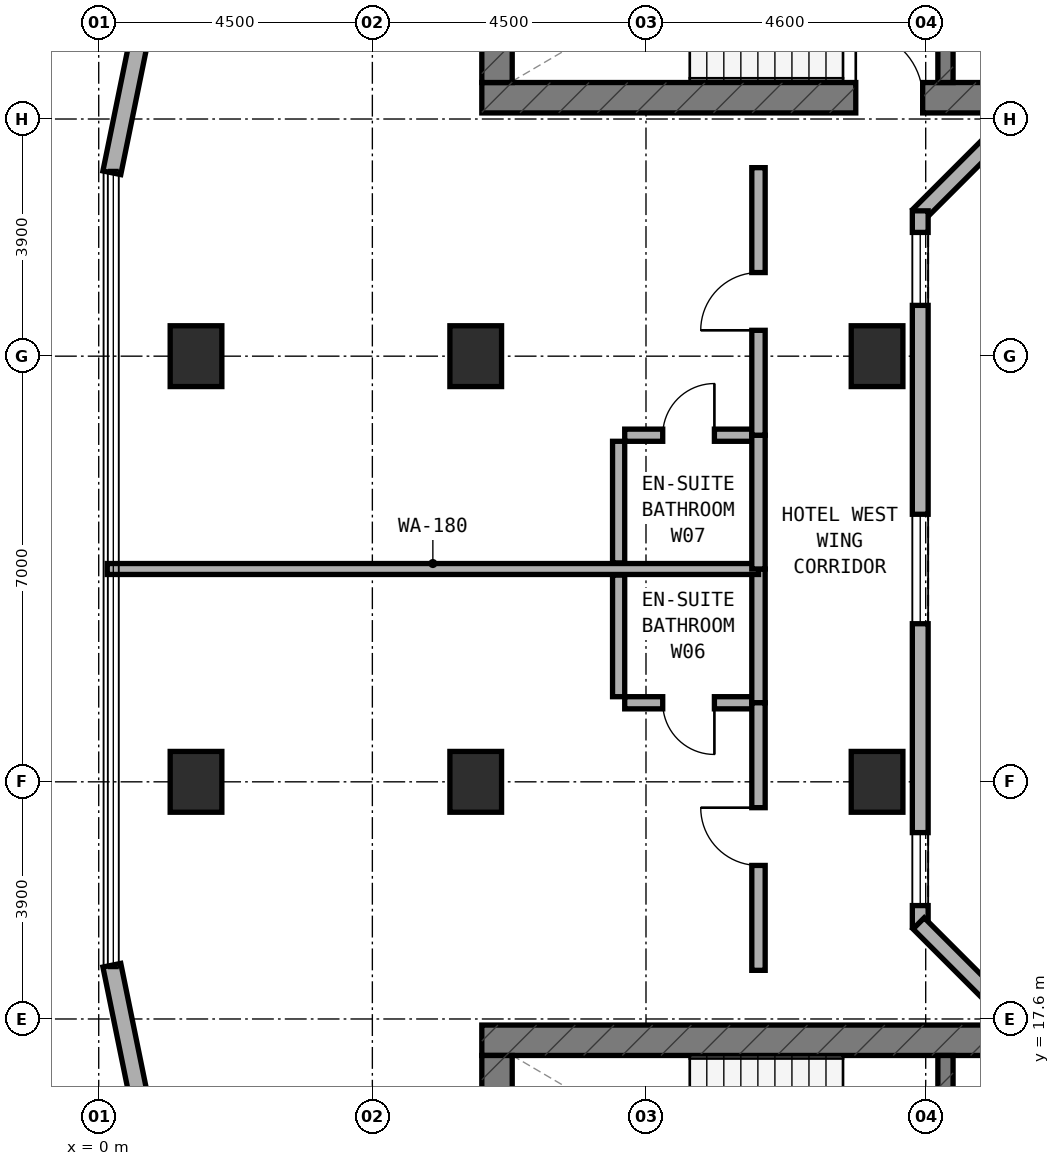
"""IFC4 building model, lengths in metres.
Left out: names, types, materials, properties, quantities, classifications, styles, units other than length and angle.
Written with IfcOpenShell. Run it as: python <this file> out.ifc"""

import sys

from ifc_helpers import new_model, si_unit, direction, frame, frame_2d, origin, origin_2d, place, context, subcontext, project, spatial, rectangle, extrude, element, fill, save


model = new_model("IFC4")
c1 = context("Model", 3, precision=1e-05, world=origin(), true_north=direction((0.0, 1.0)))
c2 = subcontext(c1, "Body", "Model", "MODEL_VIEW")
j1 = project(units=[si_unit("LENGTHUNIT", "METRE"), si_unit("PLANEANGLEUNIT", "RADIAN")], contexts=[c1])
p1 = place(None, origin())
s1 = spatial("IfcSite", under=j1, at=p1, CompositionType="ELEMENT")
p2 = place(p1, origin())
s2 = spatial("IfcBuilding", under=s1, at=p2, CompositionType="ELEMENT")
p3 = place(p2, frame((0.0, 0.0, 83.5)))
s3 = spatial("IfcBuildingStorey", under=s2, at=p3, CompositionType="ELEMENT", Elevation=83.5)
p4 = place(p3, frame((6.3, 32.75, 0.0), z_axis=(0.0, 0.0, 1.0), x_axis=(1.0, 0.0, 0.0)))
e1 = element("IfcWall", 1, at=p4, inside=s3, PredefinedType="SHEAR", context=c2, shape_type="SweptSolid", body=[
    extrude(rectangle(XDim=24.6, YDim=0.5, at=frame_2d((12.3, 0.0))), origin(), (0.0, 0.0, 1.0), 3.5),
])
p5 = place(p4, frame((6.15, 0.0, 0.0)))
e2 = element("IfcOpeningElement", 2, at=p5, cuts=e1, PredefinedType="OPENING", context=c2, shape_type="SweptSolid", body=[
    extrude(rectangle(XDim=1.1, YDim=2.15, at=frame_2d((0.55, 1.075))), frame((0.0, 0.26, 0.0), z_axis=(0.0, -1.0, 0.0), x_axis=(1.0, 0.0, 0.0)), (0.0, 0.0, 1.0), 0.52),
])
p6 = place(p3, frame((6.55, 33.0, 0.0), z_axis=(0.0, 0.0, 1.0), x_axis=(0.0, 1.0, 0.0)))
e3 = element("IfcWall", 3, at=p6, inside=s3, PredefinedType="SHEAR", context=c2, shape_type="SweptSolid", body=[
    extrude(rectangle(XDim=3.16, YDim=0.5, at=frame_2d((1.58, 0.0))), origin(), (0.0, 0.0, 1.0), 3.5),
])
p7 = place(p3, frame((13.925, 33.0, 0.0), z_axis=(0.0, 0.0, 1.0), x_axis=(0.0, 1.0, 0.0)))
e4 = element("IfcWall", 4, at=p7, inside=s3, PredefinedType="STANDARD", context=c2, shape_type="SweptSolid", body=[
    extrude(rectangle(XDim=3.16, YDim=0.25, at=frame_2d((1.58, 0.0))), origin(), (0.0, 0.0, 1.0), 3.22),
])
p8 = place(p7, frame((0.98, 0.0, 0.0)))
e5 = element("IfcOpeningElement", 5, at=p8, cuts=e4, PredefinedType="OPENING", context=c2, shape_type="SweptSolid", body=[
    extrude(rectangle(XDim=1.1, YDim=2.15, at=frame_2d((0.55, 1.075))), frame((0.0, 0.135, 0.0), z_axis=(0.0, -1.0, 0.0), x_axis=(1.0, 0.0, 0.0)), (0.0, 0.0, 1.0), 0.27),
])
p9 = place(p3, frame((6.3, 17.25, 0.0), z_axis=(0.0, 0.0, 1.0), x_axis=(1.0, 0.0, 0.0)))
e6 = element("IfcWall", 6, at=p9, inside=s3, PredefinedType="SHEAR", context=c2, shape_type="SweptSolid", body=[
    extrude(rectangle(XDim=24.6, YDim=0.5, at=frame_2d((12.3, 0.0))), origin(), (0.0, 0.0, 1.0), 3.5),
])
p10 = place(p3, frame((6.55, 13.84, 0.0), z_axis=(0.0, 0.0, 1.0), x_axis=(0.0, 1.0, 0.0)))
e7 = element("IfcWall", 7, at=p10, inside=s3, PredefinedType="SHEAR", context=c2, shape_type="SweptSolid", body=[
    extrude(rectangle(XDim=3.16, YDim=0.5, at=frame_2d((1.58, 0.0))), origin(), (0.0, 0.0, 1.0), 3.5),
])
p11 = place(p3, frame((13.925, 13.84, 0.0), z_axis=(0.0, 0.0, 1.0), x_axis=(0.0, 1.0, 0.0)))
e8 = element("IfcWall", 8, at=p11, inside=s3, PredefinedType="STANDARD", context=c2, shape_type="SweptSolid", body=[
    extrude(rectangle(XDim=3.16, YDim=0.25, at=frame_2d((1.58, 0.0))), origin(), (0.0, 0.0, 1.0), 3.22),
])
p12 = place(p11, frame((0.98, 0.0, 0.0)))
e9 = element("IfcOpeningElement", 9, at=p12, cuts=e8, PredefinedType="OPENING", context=c2, shape_type="SweptSolid", body=[
    extrude(rectangle(XDim=1.1, YDim=2.15, at=frame_2d((0.55, 1.075))), frame((0.0, 0.135, 0.0), z_axis=(0.0, -1.0, 0.0), x_axis=(1.0, 0.0, 0.0)), (0.0, 0.0, 1.0), 0.27),
])
for number, where, z_axis, x_axis in (
    (10, (6.2, 21.5, 0.0), (0.0, 0.0, 1.0), (1.0, 0.0, 0.0)),
    (11, (6.2, 28.5, 0.0), (0.0, 0.0, 1.0), (1.0, 0.0, 0.0)),
    (12, (12.8, 21.5, 0.0), (0.0, 0.0, 1.0), (1.0, 0.0, 0.0)),
    (13, (12.8, 28.5, 0.0), (0.0, 0.0, 1.0), (1.0, 0.0, 0.0)),
    (14, (1.6, 21.5, 0.0), (0.0, 0.0, 1.0), (1.0, 0.0, 0.0)),
    (15, (1.6, 28.5, 0.0), (0.0, 0.0, 1.0), (1.0, 0.0, 0.0)),
):
    element("IfcColumn", number, at=place(p3, frame(where, z_axis=z_axis, x_axis=x_axis)), inside=s3, PredefinedType="COLUMN", context=c2, shape_type="SweptSolid", body=[
        extrude(rectangle(XDim=0.85, YDim=1.0, at=origin_2d()), origin(), (0.0, 0.0, 1.0), 3.5),
    ])
p13 = place(p3, frame((2.229, 41.378, 0.0), z_axis=(0.0, 0.0, 1.0), x_axis=(-0.199990901713, -0.979797754249, 0.0)))
e16 = element("IfcWall", 16, at=p13, inside=s3, PredefinedType="STANDARD", context=c2, shape_type="SweptSolid", body=[
    extrude(rectangle(XDim=10.065, YDim=0.3, at=frame_2d((5.033, 0.0))), origin(), (0.0, 0.0, 1.0), 3.22),
])
p14 = place(p13, frame((0.378, 0.0, 0.85)))
e17 = element("IfcOpeningElement", 17, at=p14, cuts=e16, PredefinedType="OPENING", context=c2, shape_type="SweptSolid", body=[
    extrude(rectangle(XDim=1.8, YDim=1.5, at=frame_2d((0.9, 0.75))), frame((0.0, 0.16, 0.0), z_axis=(0.0, -1.0, 0.0), x_axis=(1.0, 0.0, 0.0)), (0.0, 0.0, 1.0), 0.32),
])
p15 = place(p13, frame((5.236, 0.0, 0.8)))
e18 = element("IfcOpeningElement", 18, at=p15, cuts=e16, PredefinedType="OPENING", context=c2, shape_type="SweptSolid", body=[
    extrude(rectangle(XDim=2.4, YDim=1.6, at=frame_2d((1.2, 0.8))), frame((0.0, 0.16, 0.0), z_axis=(0.0, -1.0, 0.0), x_axis=(1.0, 0.0, 0.0)), (0.0, 0.0, 1.0), 0.32),
])
p16 = place(p3, frame((0.216, 18.484, 0.0), z_axis=(0.0, 0.0, 1.0), x_axis=(0.199990901713, -0.979797754249, 0.0)))
e19 = element("IfcWall", 19, at=p16, inside=s3, PredefinedType="STANDARD", context=c2, shape_type="SweptSolid", body=[
    extrude(rectangle(XDim=10.065, YDim=0.3, at=frame_2d((5.033, 0.0))), origin(), (0.0, 0.0, 1.0), 3.22),
])
p17 = place(p16, frame((2.429, 0.0, 0.8)))
e20 = element("IfcOpeningElement", 20, at=p17, cuts=e19, PredefinedType="OPENING", context=c2, shape_type="SweptSolid", body=[
    extrude(rectangle(XDim=2.4, YDim=1.6, at=frame_2d((1.2, 0.8))), frame((0.0, 0.16, 0.0), z_axis=(0.0, -1.0, 0.0), x_axis=(1.0, 0.0, 0.0)), (0.0, 0.0, 1.0), 0.32),
])
p18 = place(p16, frame((7.887, 0.0, 0.85)))
e21 = element("IfcOpeningElement", 21, at=p18, cuts=e19, PredefinedType="OPENING", context=c2, shape_type="SweptSolid", body=[
    extrude(rectangle(XDim=1.8, YDim=1.5, at=frame_2d((0.9, 0.75))), frame((0.0, 0.16, 0.0), z_axis=(0.0, -1.0, 0.0), x_axis=(1.0, 0.0, 0.0)), (0.0, 0.0, 1.0), 0.32),
])
p19 = place(p3, frame((15.318, 32.662, 0.0), z_axis=(0.0, 0.0, 1.0), x_axis=(-0.707106781187, -0.707106781187, 0.0)))
e22 = element("IfcWall", 22, at=p19, inside=s3, PredefinedType="STANDARD", context=c2, shape_type="SweptSolid", body=[
    extrude(rectangle(XDim=2.594, YDim=0.26, at=frame_2d((1.297, 0.0))), origin(), (0.0, 0.0, 1.0), 3.22),
])
p20 = place(p3, frame((13.51, 30.89, 0.0), z_axis=(0.0, 0.0, 1.0), x_axis=(0.0, -1.0, 0.0)))
e23 = element("IfcWall", 23, at=p20, inside=s3, PredefinedType="STANDARD", context=c2, shape_type="SweptSolid", body=[
    extrude(rectangle(XDim=11.78, YDim=0.26, at=frame_2d((5.89, 0.0))), origin(), (0.0, 0.0, 1.0), 3.22),
])
p21 = place(p20, frame((0.355, 0.0, 0.85)))
e24 = element("IfcOpeningElement", 24, at=p21, cuts=e23, PredefinedType="OPENING", context=c2, shape_type="SweptSolid", body=[
    extrude(rectangle(XDim=1.2, YDim=1.5, at=frame_2d((0.6, 0.75))), frame((0.0, 0.14, 0.0), z_axis=(0.0, -1.0, 0.0), x_axis=(1.0, 0.0, 0.0)), (0.0, 0.0, 1.0), 0.28),
])
p22 = place(p20, frame((4.99, 0.0, 0.85)))
e25 = element("IfcOpeningElement", 25, at=p22, cuts=e23, PredefinedType="OPENING", context=c2, shape_type="SweptSolid", body=[
    extrude(rectangle(XDim=1.8, YDim=1.5, at=frame_2d((0.9, 0.75))), frame((0.0, 0.14, 0.0), z_axis=(0.0, -1.0, 0.0), x_axis=(1.0, 0.0, 0.0)), (0.0, 0.0, 1.0), 0.28),
])
p23 = place(p20, frame((10.225, 0.0, 0.85)))
e26 = element("IfcOpeningElement", 26, at=p23, cuts=e23, PredefinedType="OPENING", context=c2, shape_type="SweptSolid", body=[
    extrude(rectangle(XDim=1.2, YDim=1.5, at=frame_2d((0.6, 0.75))), frame((0.0, 0.14, 0.0), z_axis=(0.0, -1.0, 0.0), x_axis=(1.0, 0.0, 0.0)), (0.0, 0.0, 1.0), 0.28),
])
p24 = place(p3, frame((13.484, 19.172, 0.0), z_axis=(0.0, 0.0, 1.0), x_axis=(0.707106781187, -0.707106781187, 0.0)))
e27 = element("IfcWall", 27, at=p24, inside=s3, PredefinedType="STANDARD", context=c2, shape_type="SweptSolid", body=[
    extrude(rectangle(XDim=2.594, YDim=0.26, at=frame_2d((1.297, 0.0))), origin(), (0.0, 0.0, 1.0), 3.22),
])
p25 = place(p3, frame((8.65, 22.8, 0.0), z_axis=(0.0, 0.0, 1.0), x_axis=(1.0, 0.0, 0.0)))
e28 = element("IfcWall", 28, at=p25, inside=s3, PredefinedType="PLUMBINGWALL", context=c2, shape_type="SweptSolid", body=[
    extrude(rectangle(XDim=2.1, YDim=0.2, at=frame_2d((1.05, 0.0))), origin(), (0.0, 0.0, 1.0), 3.22),
])
p26 = place(p25, frame((0.625, 0.0, 0.0)))
e29 = element("IfcOpeningElement", 29, at=p26, cuts=e28, PredefinedType="OPENING", context=c2, shape_type="SweptSolid", body=[
    extrude(rectangle(XDim=0.85, YDim=2.1, at=frame_2d((0.425, 1.05))), frame((0.0, 0.11, 0.0), z_axis=(0.0, -1.0, 0.0), x_axis=(1.0, 0.0, 0.0)), (0.0, 0.0, 1.0), 0.22),
])
p27 = place(p3, frame((8.55, 22.9, 0.0), z_axis=(0.0, 0.0, 1.0), x_axis=(0.0, 1.0, 0.0)))
e30 = element("IfcWall", 30, at=p27, inside=s3, PredefinedType="PLUMBINGWALL", context=c2, shape_type="SweptSolid", body=[
    extrude(rectangle(XDim=2.0, YDim=0.2, at=frame_2d((1.0, 0.0))), origin(), (0.0, 0.0, 1.0), 3.22),
])
p28 = place(p3, frame((10.85, 22.8, 0.0), z_axis=(0.0, 0.0, 1.0), x_axis=(0.0, 1.0, 0.0)))
e31 = element("IfcWall", 31, at=p28, inside=s3, PredefinedType="SOLIDWALL", context=c2, shape_type="SweptSolid", body=[
    extrude(rectangle(XDim=2.2, YDim=0.22, at=frame_2d((1.1, 0.0))), origin(), (0.0, 0.0, 1.0), 3.22),
])
p29 = place(p3, frame((10.85, 18.4, 0.0), z_axis=(0.0, 0.0, 1.0), x_axis=(0.0, 1.0, 0.0)))
e32 = element("IfcWall", 32, at=p29, inside=s3, PredefinedType="SOLIDWALL", context=c2, shape_type="SweptSolid", body=[
    extrude(rectangle(XDim=4.4, YDim=0.22, at=frame_2d((2.2, 0.0))), origin(), (0.0, 0.0, 1.0), 2.595),
])
p30 = place(p29, frame((1.725, 0.0, 0.0)))
e33 = element("IfcOpeningElement", 33, at=p30, cuts=e32, PredefinedType="OPENING", context=c2, shape_type="SweptSolid", body=[
    extrude(rectangle(XDim=0.95, YDim=2.1, at=frame_2d((0.475, 1.05))), frame((0.0, 0.12, 0.0), z_axis=(0.0, -1.0, 0.0), x_axis=(1.0, 0.0, 0.0)), (0.0, 0.0, 1.0), 0.24),
])
p31 = place(p3, frame((0.14, 25.0, 0.0), z_axis=(0.0, 0.0, 1.0), x_axis=(1.0, 0.0, 0.0)))
e34 = element("IfcWall", 34, at=p31, inside=s3, PredefinedType="SOLIDWALL", context=c2, shape_type="SweptSolid", body=[
    extrude(rectangle(XDim=10.71, YDim=0.18, at=frame_2d((5.355, 0.0))), origin(), (0.0, 0.0, 1.0), 2.745),
])
p32 = place(p3, frame((8.65, 27.2, 0.0), z_axis=(0.0, 0.0, 1.0), x_axis=(1.0, 0.0, 0.0)))
e35 = element("IfcWall", 35, at=p32, inside=s3, PredefinedType="PLUMBINGWALL", context=c2, shape_type="SweptSolid", body=[
    extrude(rectangle(XDim=2.1, YDim=0.2, at=frame_2d((1.05, 0.0))), origin(), (0.0, 0.0, 1.0), 3.22),
])
p33 = place(p32, frame((0.625, 0.0, 0.0)))
e36 = element("IfcOpeningElement", 36, at=p33, cuts=e35, PredefinedType="OPENING", context=c2, shape_type="SweptSolid", body=[
    extrude(rectangle(XDim=0.85, YDim=2.1, at=frame_2d((0.425, 1.05))), frame((0.0, 0.11, 0.0), z_axis=(0.0, -1.0, 0.0), x_axis=(1.0, 0.0, 0.0)), (0.0, 0.0, 1.0), 0.22),
])
p34 = place(p3, frame((8.55, 25.1, 0.0), z_axis=(0.0, 0.0, 1.0), x_axis=(0.0, 1.0, 0.0)))
e37 = element("IfcWall", 37, at=p34, inside=s3, PredefinedType="PLUMBINGWALL", context=c2, shape_type="SweptSolid", body=[
    extrude(rectangle(XDim=2.0, YDim=0.2, at=frame_2d((1.0, 0.0))), origin(), (0.0, 0.0, 1.0), 3.22),
])
p35 = place(p3, frame((10.85, 25.0, 0.0), z_axis=(0.0, 0.0, 1.0), x_axis=(0.0, 1.0, 0.0)))
e38 = element("IfcWall", 38, at=p35, inside=s3, PredefinedType="SOLIDWALL", context=c2, shape_type="SweptSolid", body=[
    extrude(rectangle(XDim=2.2, YDim=0.22, at=frame_2d((1.1, 0.0))), origin(), (0.0, 0.0, 1.0), 3.22),
])
p36 = place(p3, frame((10.85, 27.2, 0.0), z_axis=(0.0, 0.0, 1.0), x_axis=(0.0, 1.0, 0.0)))
e39 = element("IfcWall", 39, at=p36, inside=s3, PredefinedType="SOLIDWALL", context=c2, shape_type="SweptSolid", body=[
    extrude(rectangle(XDim=4.4, YDim=0.22, at=frame_2d((2.2, 0.0))), origin(), (0.0, 0.0, 1.0), 2.595),
])
p37 = place(p36, frame((1.725, 0.0, 0.0)))
e40 = element("IfcOpeningElement", 40, at=p37, cuts=e39, PredefinedType="OPENING", context=c2, shape_type="SweptSolid", body=[
    extrude(rectangle(XDim=0.95, YDim=2.1, at=frame_2d((0.475, 1.05))), frame((0.0, 0.12, 0.0), z_axis=(0.0, -1.0, 0.0), x_axis=(1.0, 0.0, 0.0)), (0.0, 0.0, 1.0), 0.24),
])
p38 = place(p21, origin())
e41 = element("IfcWindow", 41, at=p38, inside=s3, PartitioningType="SINGLE_PANEL", PredefinedType="WINDOW", context=c2, shape_type="SweptSolid", body=[
    extrude(rectangle(XDim=1.2, YDim=1.5, at=frame_2d((0.6, 0.75))), frame((0.0, 0.03, 0.0), z_axis=(0.0, -1.0, 0.0), x_axis=(1.0, 0.0, 0.0)), (0.0, 0.0, 1.0), 0.06),
])
fill(e24, e41)
p39 = place(p22, origin())
e42 = element("IfcWindow", 42, at=p39, inside=s3, PartitioningType="SINGLE_PANEL", PredefinedType="WINDOW", context=c2, shape_type="SweptSolid", body=[
    extrude(rectangle(XDim=1.8, YDim=1.5, at=frame_2d((0.9, 0.75))), frame((0.0, 0.03, 0.0), z_axis=(0.0, -1.0, 0.0), x_axis=(1.0, 0.0, 0.0)), (0.0, 0.0, 1.0), 0.06),
])
fill(e25, e42)
p40 = place(p23, origin())
e43 = element("IfcWindow", 43, at=p40, inside=s3, PartitioningType="SINGLE_PANEL", PredefinedType="WINDOW", context=c2, shape_type="SweptSolid", body=[
    extrude(rectangle(XDim=1.2, YDim=1.5, at=frame_2d((0.6, 0.75))), frame((0.0, 0.03, 0.0), z_axis=(0.0, -1.0, 0.0), x_axis=(1.0, 0.0, 0.0)), (0.0, 0.0, 1.0), 0.06),
])
fill(e26, e43)
p41 = place(p5, origin())
e44 = element("IfcDoor", 44, at=p41, inside=s3, OperationType="SINGLE_SWING_LEFT", PredefinedType="DOOR", context=c2, shape_type="SweptSolid", body=[
    extrude(rectangle(XDim=1.1, YDim=2.15, at=frame_2d((0.55, 1.075))), frame((0.0, 0.025, 0.0), z_axis=(0.0, -1.0, 0.0), x_axis=(1.0, 0.0, 0.0)), (0.0, 0.0, 1.0), 0.05),
])
fill(e2, e44)
p42 = place(p26, frame((0.85, 0.0, 0.0), z_axis=(0.0, 0.0, 1.0), x_axis=(-1.0, 0.0, 0.0)))
e45 = element("IfcDoor", 45, at=p42, inside=s3, OperationType="SINGLE_SWING_LEFT", PredefinedType="DOOR", context=c2, shape_type="SweptSolid", body=[
    extrude(rectangle(XDim=0.85, YDim=2.1, at=frame_2d((0.425, 1.05))), frame((0.0, 0.025, 0.0), z_axis=(0.0, -1.0, 0.0), x_axis=(1.0, 0.0, 0.0)), (0.0, 0.0, 1.0), 0.05),
])
fill(e29, e45)
p43 = place(p30, origin())
e46 = element("IfcDoor", 46, at=p43, inside=s3, OperationType="SINGLE_SWING_RIGHT", PredefinedType="DOOR", context=c2, shape_type="SweptSolid", body=[
    extrude(rectangle(XDim=0.95, YDim=2.1, at=frame_2d((0.475, 1.05))), frame((0.0, 0.025, 0.0), z_axis=(0.0, -1.0, 0.0), x_axis=(1.0, 0.0, 0.0)), (0.0, 0.0, 1.0), 0.05),
])
fill(e33, e46)
p44 = place(p33, origin())
e47 = element("IfcDoor", 47, at=p44, inside=s3, OperationType="SINGLE_SWING_RIGHT", PredefinedType="DOOR", context=c2, shape_type="SweptSolid", body=[
    extrude(rectangle(XDim=0.85, YDim=2.1, at=frame_2d((0.425, 1.05))), frame((0.0, 0.025, 0.0), z_axis=(0.0, -1.0, 0.0), x_axis=(1.0, 0.0, 0.0)), (0.0, 0.0, 1.0), 0.05),
])
fill(e36, e47)
p45 = place(p37, origin())
e48 = element("IfcDoor", 48, at=p45, inside=s3, OperationType="SINGLE_SWING_LEFT", PredefinedType="DOOR", context=c2, shape_type="SweptSolid", body=[
    extrude(rectangle(XDim=0.95, YDim=2.1, at=frame_2d((0.475, 1.05))), frame((0.0, 0.025, 0.0), z_axis=(0.0, -1.0, 0.0), x_axis=(1.0, 0.0, 0.0)), (0.0, 0.0, 1.0), 0.05),
])
fill(e40, e48)
save(model, sys.argv[1])
